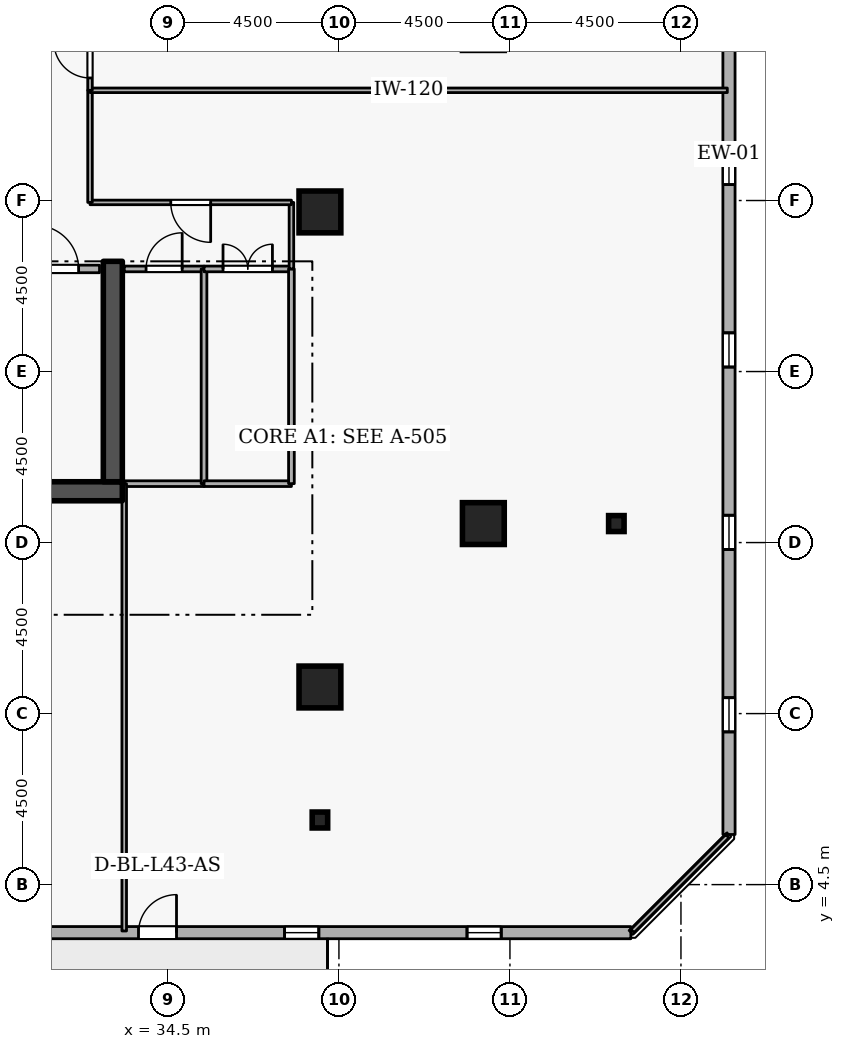
"""IFC4 building model, lengths in metres.
Left out: names, types, materials, properties, quantities, classifications, styles, units other than length and angle.
Written with IfcOpenShell. Run it as: python <this file> out.ifc"""

import sys

from ifc_helpers import new_model, si_unit, direction, frame, frame_2d, origin, origin_2d, place, context, subcontext, project, spatial, rectangle, i_section, extrude, element, fill, save


model = new_model("IFC4")
c1 = context("Model", 3, precision=1e-05, world=origin(), true_north=direction((0.0, 1.0)))
c2 = subcontext(c1, "Body", "Model", "MODEL_VIEW")
j1 = project(units=[si_unit("LENGTHUNIT", "METRE"), si_unit("PLANEANGLEUNIT", "RADIAN")], contexts=[c1])
p1 = place(None, origin())
s1 = spatial("IfcSite", under=j1, at=p1, CompositionType="ELEMENT")
p2 = place(p1, origin())
s2 = spatial("IfcBuilding", under=s1, at=p2, CompositionType="ELEMENT")
p3 = place(p2, frame((0.0, 0.0, 163.5)))
s3 = spatial("IfcBuildingStorey", under=s2, at=p3, CompositionType="ELEMENT", Elevation=163.5)
p4 = place(p3, frame((17.7, 14.85, 0.0), z_axis=(0.0, 0.0, 1.0), x_axis=(1.0, 0.0, 0.0)))
e1 = element("IfcWall", 1, at=p4, inside=s3, PredefinedType="SHEAR", context=c2, shape_type="SweptSolid", body=[
    extrude(rectangle(XDim=15.6, YDim=0.5, at=frame_2d((7.8, 0.0))), origin(), (0.0, 0.0, 1.0), 3.6),
])
p5 = place(p3, frame((33.05, 15.1, 0.0), z_axis=(0.0, 0.0, 1.0), x_axis=(0.0, 1.0, 0.0)))
e2 = element("IfcWall", 2, at=p5, inside=s3, PredefinedType="SHEAR", context=c2, shape_type="SweptSolid", body=[
    extrude(rectangle(XDim=5.8, YDim=0.5, at=frame_2d((2.9, 0.0))), origin(), (0.0, 0.0, 1.0), 3.6),
])
for number, where, z_axis, x_axis in (
    (3, (38.5, 9.7, 0.0), (0.0, 0.0, 1.0), (1.0, 0.0, 0.0)),
    (4, (42.8, 14.0, 0.0), (0.0, 0.0, 1.0), (1.0, 0.0, 0.0)),
    (5, (38.5, 22.2, 0.0), (0.0, 0.0, 1.0), (1.0, 0.0, 0.0)),
):
    element("IfcColumn", number, at=place(p3, frame(where, z_axis=z_axis, x_axis=x_axis)), inside=s3, PredefinedType="COLUMN", context=c2, shape_type="SweptSolid", body=[
        extrude(rectangle(XDim=1.1, YDim=1.1, at=origin_2d()), origin(), (0.0, 0.0, 1.0), 3.6),
    ])
for number, where, z_axis, x_axis in (
    (6, (38.5, 6.2, 0.0), (0.0, 0.0, 1.0), (1.0, 0.0, 0.0)),
    (7, (46.3, 14.0, 0.0), (0.0, 0.0, 1.0), (1.0, 0.0, 0.0)),
):
    element("IfcColumn", number, at=place(p3, frame(where, z_axis=z_axis, x_axis=x_axis)), inside=s3, PredefinedType="COLUMN", context=c2, shape_type="SweptSolid", body=[
        extrude(i_section(OverallWidth=0.407, OverallDepth=0.419, WebThickness=0.031, FlangeThickness=0.049, FilletRadius=0.015, at=origin_2d()), origin(), (0.0, 0.0, 1.0), 3.6),
    ])
p6 = place(p3, frame((10.871, 3.237, 0.0), z_axis=(0.0, 0.0, 1.0), x_axis=(0.999999998513, -5.4540124e-05, 0.0)))
e8 = element("IfcWall", 8, at=p6, inside=s3, PredefinedType="STANDARD", context=c2, shape_type="SweptSolid", body=[
    extrude(rectangle(XDim=35.811, YDim=0.32, at=frame_2d((17.905, 0.0))), origin(), (0.0, 0.0, 1.0), 2.7),
])
p7 = place(p6, frame((22.855, 0.0, 0.0)))
e9 = element("IfcOpeningElement", 9, at=p7, cuts=e8, PredefinedType="OPENING", context=c2, shape_type="SweptSolid", body=[
    extrude(rectangle(XDim=1.0, YDim=2.08, at=frame_2d((0.5, 1.04))), frame((0.0, 0.17, 0.0), z_axis=(0.0, -1.0, 0.0), x_axis=(1.0, 0.0, 0.0)), (0.0, 0.0, 1.0), 0.34),
])
p8 = place(p6, frame((2.7, 0.0, 0.72)))
e10 = element("IfcOpeningElement", 10, at=p8, cuts=e8, PredefinedType="OPENING", context=c2, shape_type="SweptSolid", body=[
    extrude(rectangle(XDim=0.9, YDim=1.75, at=frame_2d((0.45, 0.875))), frame((0.0, 0.17, 0.0), z_axis=(0.0, -1.0, 0.0), x_axis=(1.0, 0.0, 0.0)), (0.0, 0.0, 1.0), 0.34),
])
p9 = place(p6, frame((7.5, 0.0, 0.72)))
e11 = element("IfcOpeningElement", 11, at=p9, cuts=e8, PredefinedType="OPENING", context=c2, shape_type="SweptSolid", body=[
    extrude(rectangle(XDim=0.9, YDim=1.75, at=frame_2d((0.45, 0.875))), frame((0.0, 0.17, 0.0), z_axis=(0.0, -1.0, 0.0), x_axis=(1.0, 0.0, 0.0)), (0.0, 0.0, 1.0), 0.34),
])
p10 = place(p6, frame((12.3, 0.0, 0.72)))
e12 = element("IfcOpeningElement", 12, at=p10, cuts=e8, PredefinedType="OPENING", context=c2, shape_type="SweptSolid", body=[
    extrude(rectangle(XDim=0.9, YDim=1.75, at=frame_2d((0.45, 0.875))), frame((0.0, 0.17, 0.0), z_axis=(0.0, -1.0, 0.0), x_axis=(1.0, 0.0, 0.0)), (0.0, 0.0, 1.0), 0.34),
])
p11 = place(p6, frame((17.1, 0.0, 0.72)))
e13 = element("IfcOpeningElement", 13, at=p11, cuts=e8, PredefinedType="OPENING", context=c2, shape_type="SweptSolid", body=[
    extrude(rectangle(XDim=0.9, YDim=1.75, at=frame_2d((0.45, 0.875))), frame((0.0, 0.17, 0.0), z_axis=(0.0, -1.0, 0.0), x_axis=(1.0, 0.0, 0.0)), (0.0, 0.0, 1.0), 0.34),
])
p12 = place(p6, frame((26.7, 0.0, 0.72)))
e14 = element("IfcOpeningElement", 14, at=p12, cuts=e8, PredefinedType="OPENING", context=c2, shape_type="SweptSolid", body=[
    extrude(rectangle(XDim=0.9, YDim=1.75, at=frame_2d((0.45, 0.875))), frame((0.0, 0.17, 0.0), z_axis=(0.0, -1.0, 0.0), x_axis=(1.0, 0.0, 0.0)), (0.0, 0.0, 1.0), 0.34),
])
p13 = place(p6, frame((31.5, 0.0, 0.72)))
e15 = element("IfcOpeningElement", 15, at=p13, cuts=e8, PredefinedType="OPENING", context=c2, shape_type="SweptSolid", body=[
    extrude(rectangle(XDim=0.9, YDim=1.75, at=frame_2d((0.45, 0.875))), frame((0.0, 0.17, 0.0), z_axis=(0.0, -1.0, 0.0), x_axis=(1.0, 0.0, 0.0)), (0.0, 0.0, 1.0), 0.34),
])
p14 = place(p3, frame((49.265, 5.819, 0.0), z_axis=(0.0, 0.0, 1.0), x_axis=(-5.4540124e-05, 0.999999998513, 0.0)))
e16 = element("IfcWall", 16, at=p14, inside=s3, PredefinedType="STANDARD", context=c2, shape_type="SweptSolid", body=[
    extrude(rectangle(XDim=35.811, YDim=0.32, at=frame_2d((17.905, 0.0))), origin(), (0.0, 0.0, 1.0), 2.7),
])
p15 = place(p14, frame((2.7, 0.0, 0.72)))
e17 = element("IfcOpeningElement", 17, at=p15, cuts=e16, PredefinedType="OPENING", context=c2, shape_type="SweptSolid", body=[
    extrude(rectangle(XDim=0.9, YDim=1.75, at=frame_2d((0.45, 0.875))), frame((0.0, 0.17, 0.0), z_axis=(0.0, -1.0, 0.0), x_axis=(1.0, 0.0, 0.0)), (0.0, 0.0, 1.0), 0.34),
])
p16 = place(p14, frame((7.5, 0.0, 0.72)))
e18 = element("IfcOpeningElement", 18, at=p16, cuts=e16, PredefinedType="OPENING", context=c2, shape_type="SweptSolid", body=[
    extrude(rectangle(XDim=0.9, YDim=1.75, at=frame_2d((0.45, 0.875))), frame((0.0, 0.17, 0.0), z_axis=(0.0, -1.0, 0.0), x_axis=(1.0, 0.0, 0.0)), (0.0, 0.0, 1.0), 0.34),
])
p17 = place(p14, frame((12.3, 0.0, 0.72)))
e19 = element("IfcOpeningElement", 19, at=p17, cuts=e16, PredefinedType="OPENING", context=c2, shape_type="SweptSolid", body=[
    extrude(rectangle(XDim=0.9, YDim=1.75, at=frame_2d((0.45, 0.875))), frame((0.0, 0.17, 0.0), z_axis=(0.0, -1.0, 0.0), x_axis=(1.0, 0.0, 0.0)), (0.0, 0.0, 1.0), 0.34),
])
p18 = place(p14, frame((17.1, 0.0, 0.72)))
e20 = element("IfcOpeningElement", 20, at=p18, cuts=e16, PredefinedType="OPENING", context=c2, shape_type="SweptSolid", body=[
    extrude(rectangle(XDim=0.9, YDim=1.75, at=frame_2d((0.45, 0.875))), frame((0.0, 0.17, 0.0), z_axis=(0.0, -1.0, 0.0), x_axis=(1.0, 0.0, 0.0)), (0.0, 0.0, 1.0), 0.34),
])
p19 = place(p14, frame((21.9, 0.0, 0.72)))
e21 = element("IfcOpeningElement", 21, at=p19, cuts=e16, PredefinedType="OPENING", context=c2, shape_type="SweptSolid", body=[
    extrude(rectangle(XDim=0.9, YDim=1.75, at=frame_2d((0.45, 0.875))), frame((0.0, 0.17, 0.0), z_axis=(0.0, -1.0, 0.0), x_axis=(1.0, 0.0, 0.0)), (0.0, 0.0, 1.0), 0.34),
])
p20 = place(p14, frame((26.7, 0.0, 0.72)))
e22 = element("IfcOpeningElement", 22, at=p20, cuts=e16, PredefinedType="OPENING", context=c2, shape_type="SweptSolid", body=[
    extrude(rectangle(XDim=0.9, YDim=1.75, at=frame_2d((0.45, 0.875))), frame((0.0, 0.17, 0.0), z_axis=(0.0, -1.0, 0.0), x_axis=(1.0, 0.0, 0.0)), (0.0, 0.0, 1.0), 0.34),
])
p21 = place(p14, frame((31.5, 0.0, 0.72)))
e23 = element("IfcOpeningElement", 23, at=p21, cuts=e16, PredefinedType="OPENING", context=c2, shape_type="SweptSolid", body=[
    extrude(rectangle(XDim=0.9, YDim=1.75, at=frame_2d((0.45, 0.875))), frame((0.0, 0.17, 0.0), z_axis=(0.0, -1.0, 0.0), x_axis=(1.0, 0.0, 0.0)), (0.0, 0.0, 1.0), 0.34),
])
p22 = place(p3, frame((30.45, 20.7, 0.0), z_axis=(0.0, 0.0, 1.0), x_axis=(1.0, 0.0, 0.0)))
e24 = element("IfcWall", 24, at=p22, inside=s3, PredefinedType="STANDARD", context=c2, shape_type="SweptSolid", body=[
    extrude(rectangle(XDim=2.25, YDim=0.2, at=frame_2d((1.125, 0.0))), origin(), (0.0, 0.0, 1.0), 3.34),
])
p23 = place(p22, frame((0.55, 0.0, 0.0)))
e25 = element("IfcOpeningElement", 25, at=p23, cuts=e24, PredefinedType="OPENING", context=c2, shape_type="SweptSolid", body=[
    extrude(rectangle(XDim=1.15, YDim=2.1, at=frame_2d((0.575, 1.05))), frame((0.0, 0.11, 0.0), z_axis=(0.0, -1.0, 0.0), x_axis=(1.0, 0.0, 0.0)), (0.0, 0.0, 1.0), 0.22),
])
p24 = place(p3, frame((35.45, 15.05, 0.0), z_axis=(0.0, 0.0, 1.0), x_axis=(-1.0, 0.0, 0.0)))
e26 = element("IfcWall", 26, at=p24, inside=s3, PredefinedType="PARTITIONING", context=c2, shape_type="SweptSolid", body=[
    extrude(rectangle(XDim=2.1, YDim=0.15, at=frame_2d((1.05, 0.0))), origin(), (0.0, 0.0, 1.0), 3.34),
])
p25 = place(p3, frame((33.35, 20.7, 0.0), z_axis=(0.0, 0.0, 1.0), x_axis=(1.0, 0.0, 0.0)))
e27 = element("IfcWall", 27, at=p25, inside=s3, PredefinedType="PARTITIONING", context=c2, shape_type="SweptSolid", body=[
    extrude(rectangle(XDim=2.1, YDim=0.15, at=frame_2d((1.05, 0.0))), origin(), (0.0, 0.0, 1.0), 3.34),
])
p26 = place(p25, frame((0.575, 0.0, 0.0)))
e28 = element("IfcOpeningElement", 28, at=p26, cuts=e27, PredefinedType="OPENING", context=c2, shape_type="SweptSolid", body=[
    extrude(rectangle(XDim=0.95, YDim=2.1, at=frame_2d((0.475, 1.05))), frame((0.0, 0.085, 0.0), z_axis=(0.0, -1.0, 0.0), x_axis=(1.0, 0.0, 0.0)), (0.0, 0.0, 1.0), 0.17),
])
p27 = place(p3, frame((35.45, 20.7, 0.0), z_axis=(0.0, 0.0, 1.0), x_axis=(0.0, -1.0, 0.0)))
e29 = element("IfcWall", 29, at=p27, inside=s3, PredefinedType="PARTITIONING", context=c2, shape_type="SweptSolid", body=[
    extrude(rectangle(XDim=5.65, YDim=0.15, at=frame_2d((2.825, 0.0))), origin(), (0.0, 0.0, 1.0), 3.34),
])
p28 = place(p3, frame((37.75, 15.05, 0.0), z_axis=(0.0, 0.0, 1.0), x_axis=(-1.0, 0.0, 0.0)))
e30 = element("IfcWall", 30, at=p28, inside=s3, PredefinedType="PARTITIONING", context=c2, shape_type="SweptSolid", body=[
    extrude(rectangle(XDim=2.3, YDim=0.15, at=frame_2d((1.15, 0.0))), origin(), (0.0, 0.0, 1.0), 3.34),
])
p29 = place(p3, frame((35.45, 20.7, 0.0), z_axis=(0.0, 0.0, 1.0), x_axis=(1.0, 0.0, 0.0)))
e31 = element("IfcWall", 31, at=p29, inside=s3, PredefinedType="PARTITIONING", context=c2, shape_type="SweptSolid", body=[
    extrude(rectangle(XDim=2.3, YDim=0.15, at=frame_2d((1.15, 0.0))), origin(), (0.0, 0.0, 1.0), 3.34),
])
p30 = place(p29, frame((0.5, 0.0, 0.0)))
e32 = element("IfcOpeningElement", 32, at=p30, cuts=e31, PredefinedType="OPENING", context=c2, shape_type="SweptSolid", body=[
    extrude(rectangle(XDim=1.3, YDim=2.12, at=frame_2d((0.65, 1.06))), frame((0.0, 0.085, 0.0), z_axis=(0.0, -1.0, 0.0), x_axis=(1.0, 0.0, 0.0)), (0.0, 0.0, 1.0), 0.17),
])
p31 = place(p3, frame((37.75, 20.7, 0.0), z_axis=(0.0, 0.0, 1.0), x_axis=(0.0, -1.0, 0.0)))
e33 = element("IfcWall", 33, at=p31, inside=s3, PredefinedType="PARTITIONING", context=c2, shape_type="SweptSolid", body=[
    extrude(rectangle(XDim=5.65, YDim=0.15, at=frame_2d((2.825, 0.0))), origin(), (0.0, 0.0, 1.0), 3.34),
])
p32 = place(p3, frame((33.35, 3.28, 0.0), z_axis=(0.0, 0.0, 1.0), x_axis=(0.0, 1.0, 0.0)))
e34 = element("IfcWall", 34, at=p32, inside=s3, PredefinedType="PARTITIONING", context=c2, shape_type="SweptSolid", body=[
    extrude(rectangle(XDim=11.77, YDim=0.12, at=frame_2d((5.885, 0.0))), origin(), (0.0, 0.0, 1.0), 2.545),
])
p33 = place(p3, frame((37.75, 20.7, 0.0), z_axis=(0.0, 0.0, 1.0), x_axis=(0.0, 1.0, 0.0)))
e35 = element("IfcWall", 35, at=p33, inside=s3, PredefinedType="PARTITIONING", context=c2, shape_type="SweptSolid", body=[
    extrude(rectangle(XDim=1.75, YDim=0.12, at=frame_2d((0.875, 0.0))), origin(), (0.0, 0.0, 1.0), 3.34),
])
p34 = place(p3, frame((37.75, 22.45, 0.0), z_axis=(0.0, 0.0, 1.0), x_axis=(-1.0, 0.0, 0.0)))
e36 = element("IfcWall", 36, at=p34, inside=s3, PredefinedType="PARTITIONING", context=c2, shape_type="SweptSolid", body=[
    extrude(rectangle(XDim=5.3, YDim=0.12, at=frame_2d((2.65, 0.0))), origin(), (0.0, 0.0, 1.0), 3.34),
])
p35 = place(p34, frame((2.125, 0.0, 0.0)))
e37 = element("IfcOpeningElement", 37, at=p35, cuts=e36, PredefinedType="OPENING", context=c2, shape_type="SweptSolid", body=[
    extrude(rectangle(XDim=1.05, YDim=2.1, at=frame_2d((0.525, 1.05))), frame((0.0, 0.07, 0.0), z_axis=(0.0, -1.0, 0.0), x_axis=(1.0, 0.0, 0.0)), (0.0, 0.0, 1.0), 0.14),
])
p36 = place(p3, frame((32.45, 22.45, 0.0), z_axis=(0.0, 0.0, 1.0), x_axis=(0.0, 1.0, 0.0)))
e38 = element("IfcWall", 38, at=p36, inside=s3, PredefinedType="PARTITIONING", context=c2, shape_type="SweptSolid", body=[
    extrude(rectangle(XDim=2.95, YDim=0.12, at=frame_2d((1.475, 0.0))), origin(), (0.0, 0.0, 1.0), 3.34),
])
p37 = place(p3, frame((32.45, 25.4, 0.0), z_axis=(0.0, 0.0, 1.0), x_axis=(1.0, 0.0, 0.0)))
e39 = element("IfcWall", 39, at=p37, inside=s3, PredefinedType="PARTITIONING", context=c2, shape_type="SweptSolid", body=[
    extrude(rectangle(XDim=16.77, YDim=0.12, at=frame_2d((8.385, 0.0))), origin(), (0.0, 0.0, 1.0), 3.34),
])
p38 = place(p3, frame((49.22, 5.775, 0.0), z_axis=(0.0, 0.0, 1.0), x_axis=(-0.707106781187, -0.707106781187, 0.0)))
e40 = element("IfcWall", 40, at=p38, inside=s3, PredefinedType="PARTITIONING", context=c2, shape_type="SweptSolid", body=[
    extrude(rectangle(XDim=3.528, YDim=0.12, at=frame_2d((1.764, 0.0))), origin(), (0.0, 0.0, 1.0), 3.34),
])
p39 = place(p3, frame((32.45, 25.4, 0.0), z_axis=(0.0, 0.0, 1.0), x_axis=(0.0, 1.0, 0.0)))
e41 = element("IfcWall", 41, at=p39, inside=s3, PredefinedType="PARTITIONING", context=c2, shape_type="SweptSolid", body=[
    extrude(rectangle(XDim=1.6, YDim=0.12, at=frame_2d((0.8, 0.0))), origin(), (0.0, 0.0, 1.0), 3.34),
])
p40 = place(p39, frame((0.325, 0.0, 0.0)))
e42 = element("IfcOpeningElement", 42, at=p40, cuts=e41, PredefinedType="OPENING", context=c2, shape_type="SweptSolid", body=[
    extrude(rectangle(XDim=0.95, YDim=2.1, at=frame_2d((0.475, 1.05))), frame((0.0, 0.07, 0.0), z_axis=(0.0, -1.0, 0.0), x_axis=(1.0, 0.0, 0.0)), (0.0, 0.0, 1.0), 0.14),
])
p41 = place(p7, origin())
e43 = element("IfcDoor", 43, at=p41, inside=s3, OperationType="SINGLE_SWING_RIGHT", PredefinedType="DOOR", context=c2, shape_type="SweptSolid", body=[
    extrude(rectangle(XDim=1.0, YDim=2.08, at=frame_2d((0.5, 1.04))), frame((0.0, 0.025, 0.0), z_axis=(0.0, -1.0, 0.0), x_axis=(1.0, 0.0, 0.0)), (0.0, 0.0, 1.0), 0.05),
])
fill(e9, e43)
p42 = place(p12, origin())
e44 = element("IfcWindow", 44, at=p42, inside=s3, PartitioningType="SINGLE_PANEL", PredefinedType="WINDOW", context=c2, shape_type="SweptSolid", body=[
    extrude(rectangle(XDim=0.9, YDim=1.75, at=frame_2d((0.45, 0.875))), frame((0.0, 0.03, 0.0), z_axis=(0.0, -1.0, 0.0), x_axis=(1.0, 0.0, 0.0)), (0.0, 0.0, 1.0), 0.06),
])
fill(e14, e44)
p43 = place(p13, origin())
e45 = element("IfcWindow", 45, at=p43, inside=s3, PartitioningType="SINGLE_PANEL", PredefinedType="WINDOW", context=c2, shape_type="SweptSolid", body=[
    extrude(rectangle(XDim=0.9, YDim=1.75, at=frame_2d((0.45, 0.875))), frame((0.0, 0.03, 0.0), z_axis=(0.0, -1.0, 0.0), x_axis=(1.0, 0.0, 0.0)), (0.0, 0.0, 1.0), 0.06),
])
fill(e15, e45)
p44 = place(p15, origin())
e46 = element("IfcWindow", 46, at=p44, inside=s3, PartitioningType="SINGLE_PANEL", PredefinedType="WINDOW", context=c2, shape_type="SweptSolid", body=[
    extrude(rectangle(XDim=0.9, YDim=1.75, at=frame_2d((0.45, 0.875))), frame((0.0, 0.03, 0.0), z_axis=(0.0, -1.0, 0.0), x_axis=(1.0, 0.0, 0.0)), (0.0, 0.0, 1.0), 0.06),
])
fill(e17, e46)
p45 = place(p16, origin())
e47 = element("IfcWindow", 47, at=p45, inside=s3, PartitioningType="SINGLE_PANEL", PredefinedType="WINDOW", context=c2, shape_type="SweptSolid", body=[
    extrude(rectangle(XDim=0.9, YDim=1.75, at=frame_2d((0.45, 0.875))), frame((0.0, 0.03, 0.0), z_axis=(0.0, -1.0, 0.0), x_axis=(1.0, 0.0, 0.0)), (0.0, 0.0, 1.0), 0.06),
])
fill(e18, e47)
p46 = place(p17, origin())
e48 = element("IfcWindow", 48, at=p46, inside=s3, PartitioningType="SINGLE_PANEL", PredefinedType="WINDOW", context=c2, shape_type="SweptSolid", body=[
    extrude(rectangle(XDim=0.9, YDim=1.75, at=frame_2d((0.45, 0.875))), frame((0.0, 0.03, 0.0), z_axis=(0.0, -1.0, 0.0), x_axis=(1.0, 0.0, 0.0)), (0.0, 0.0, 1.0), 0.06),
])
fill(e19, e48)
p47 = place(p18, origin())
e49 = element("IfcWindow", 49, at=p47, inside=s3, PartitioningType="SINGLE_PANEL", PredefinedType="WINDOW", context=c2, shape_type="SweptSolid", body=[
    extrude(rectangle(XDim=0.9, YDim=1.75, at=frame_2d((0.45, 0.875))), frame((0.0, 0.03, 0.0), z_axis=(0.0, -1.0, 0.0), x_axis=(1.0, 0.0, 0.0)), (0.0, 0.0, 1.0), 0.06),
])
fill(e20, e49)
p48 = place(p23, origin())
e50 = element("IfcDoor", 50, at=p48, inside=s3, OperationType="SINGLE_SWING_LEFT", PredefinedType="DOOR", context=c2, shape_type="SweptSolid", body=[
    extrude(rectangle(XDim=1.15, YDim=2.1, at=frame_2d((0.575, 1.05))), frame((0.0, 0.025, 0.0), z_axis=(0.0, -1.0, 0.0), x_axis=(1.0, 0.0, 0.0)), (0.0, 0.0, 1.0), 0.05),
])
fill(e25, e50)
p49 = place(p26, origin())
e51 = element("IfcDoor", 51, at=p49, inside=s3, OperationType="SINGLE_SWING_RIGHT", PredefinedType="DOOR", context=c2, shape_type="SweptSolid", body=[
    extrude(rectangle(XDim=0.95, YDim=2.1, at=frame_2d((0.475, 1.05))), frame((0.0, 0.025, 0.0), z_axis=(0.0, -1.0, 0.0), x_axis=(1.0, 0.0, 0.0)), (0.0, 0.0, 1.0), 0.05),
])
fill(e28, e51)
p50 = place(p30, origin())
e52 = element("IfcDoor", 52, at=p50, inside=s3, OperationType="DOUBLE_DOOR_SINGLE_SWING", PredefinedType="DOOR", context=c2, shape_type="SweptSolid", body=[
    extrude(rectangle(XDim=1.3, YDim=2.12, at=frame_2d((0.65, 1.06))), frame((0.0, 0.025, 0.0), z_axis=(0.0, -1.0, 0.0), x_axis=(1.0, 0.0, 0.0)), (0.0, 0.0, 1.0), 0.05),
])
fill(e32, e52)
p51 = place(p35, origin())
e53 = element("IfcDoor", 53, at=p51, inside=s3, OperationType="SINGLE_SWING_LEFT", PredefinedType="DOOR", context=c2, shape_type="SweptSolid", body=[
    extrude(rectangle(XDim=1.05, YDim=2.1, at=frame_2d((0.525, 1.05))), frame((0.0, 0.025, 0.0), z_axis=(0.0, -1.0, 0.0), x_axis=(1.0, 0.0, 0.0)), (0.0, 0.0, 1.0), 0.05),
])
fill(e37, e53)
p52 = place(p40, origin())
e54 = element("IfcDoor", 54, at=p52, inside=s3, OperationType="SINGLE_SWING_RIGHT", PredefinedType="DOOR", context=c2, shape_type="SweptSolid", body=[
    extrude(rectangle(XDim=0.95, YDim=2.1, at=frame_2d((0.475, 1.05))), frame((0.0, 0.025, 0.0), z_axis=(0.0, -1.0, 0.0), x_axis=(1.0, 0.0, 0.0)), (0.0, 0.0, 1.0), 0.05),
])
fill(e42, e54)
save(model, sys.argv[1])
